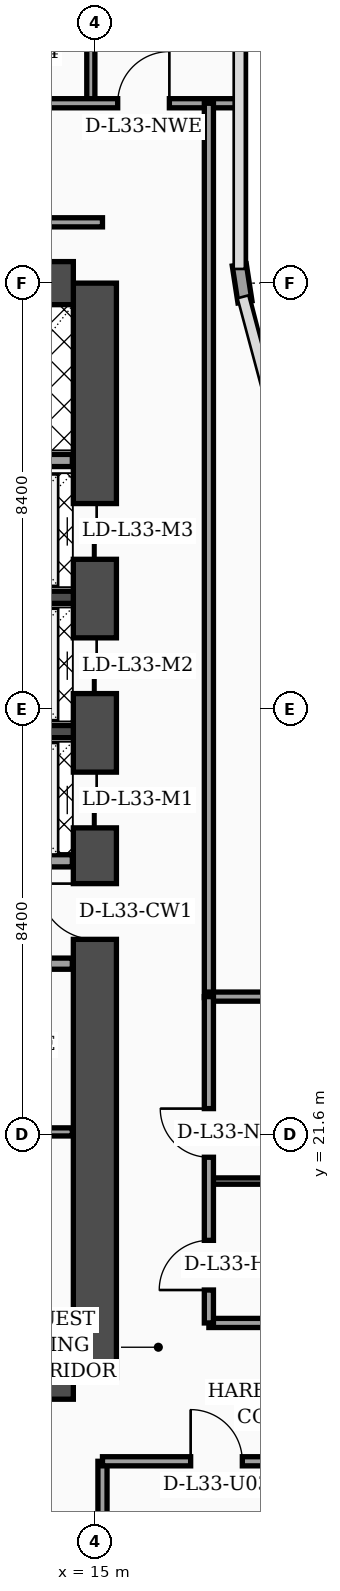
"""IFC4 building model, lengths in metres.
Left out: names, types, materials, properties, quantities, classifications, styles, units other than length and angle.
Written with IfcOpenShell. Run it as: python <this file> out.ifc"""

import sys

from ifc_helpers import new_model, si_unit, direction, frame, frame_2d, origin, place, context, subcontext, project, spatial, rectangle, extrude, element, fill, save


model = new_model("IFC4")
c1 = context("Model", 3, precision=1e-05, world=origin(), true_north=direction((0.0, 1.0)))
c2 = subcontext(c1, "Body", "Model", "MODEL_VIEW")
j1 = project(units=[si_unit("LENGTHUNIT", "METRE"), si_unit("PLANEANGLEUNIT", "RADIAN")], contexts=[c1])
p1 = place(None, origin())
s1 = spatial("IfcSite", under=j1, at=p1, CompositionType="ELEMENT")
p2 = place(p1, origin())
s2 = spatial("IfcBuilding", under=s1, at=p2, CompositionType="ELEMENT")
p3 = place(p2, frame((0.0, 0.0, 135.4)))
s3 = spatial("IfcBuildingStorey", under=s2, at=p3, CompositionType="ELEMENT", Elevation=135.4)
p4 = place(p3, frame((15.0, 16.8, 0.0), z_axis=(0.0, 0.0, 1.0), x_axis=(0.0, 1.0, 0.0)))
e1 = element("IfcWall", 1, at=p4, inside=s3, PredefinedType="SHEAR", context=c2, shape_type="SweptSolid", body=[
    extrude(rectangle(XDim=21.6, YDim=0.85, at=frame_2d((10.8, 0.0))), origin(), (0.0, 0.0, 1.0), 3.52),
])
p5 = place(p4, frame((8.65, 0.0, 0.0)))
e2 = element("IfcOpeningElement", 2, at=p5, cuts=e1, PredefinedType="OPENING", context=c2, shape_type="SweptSolid", body=[
    extrude(rectangle(XDim=1.1, YDim=2.2, at=frame_2d((0.55, 1.1))), frame((0.0, 0.435, 0.0), z_axis=(0.0, -1.0, 0.0), x_axis=(1.0, 0.0, 0.0)), (0.0, 0.0, 1.0), 0.87),
])
p6 = place(p4, frame((10.85, 0.0, 0.0)))
e3 = element("IfcOpeningElement", 3, at=p6, cuts=e1, PredefinedType="OPENING", context=c2, shape_type="SweptSolid", body=[
    extrude(rectangle(XDim=1.1, YDim=2.2, at=frame_2d((0.55, 1.1))), frame((0.0, 0.435, 0.0), z_axis=(0.0, -1.0, 0.0), x_axis=(1.0, 0.0, 0.0)), (0.0, 0.0, 1.0), 0.87),
])
p7 = place(p4, frame((13.5, 0.0, 0.0)))
e4 = element("IfcOpeningElement", 4, at=p7, cuts=e1, PredefinedType="OPENING", context=c2, shape_type="SweptSolid", body=[
    extrude(rectangle(XDim=1.1, YDim=2.2, at=frame_2d((0.55, 1.1))), frame((0.0, 0.435, 0.0), z_axis=(0.0, -1.0, 0.0), x_axis=(1.0, 0.0, 0.0)), (0.0, 0.0, 1.0), 0.87),
])
p8 = place(p4, frame((16.15, 0.0, 0.0)))
e5 = element("IfcOpeningElement", 5, at=p8, cuts=e1, PredefinedType="OPENING", context=c2, shape_type="SweptSolid", body=[
    extrude(rectangle(XDim=1.1, YDim=2.2, at=frame_2d((0.55, 1.1))), frame((0.0, 0.435, 0.0), z_axis=(0.0, -1.0, 0.0), x_axis=(1.0, 0.0, 0.0)), (0.0, 0.0, 1.0), 0.87),
])
for number, where, z_axis, x_axis in (
    (6, (4.625, 38.4, 0.0), (0.0, 0.0, 1.0), (1.0, 0.0, 0.0)),
    (7, (4.625, 16.8, 0.0), (0.0, 0.0, 1.0), (1.0, 0.0, 0.0)),
):
    element("IfcWall", number, at=place(p3, frame(where, z_axis=z_axis, x_axis=x_axis)), inside=s3, PredefinedType="SHEAR", context=c2, shape_type="SweptSolid", body=[
        extrude(rectangle(XDim=9.95, YDim=0.85, at=frame_2d((4.975, 0.0))), origin(), (0.0, 0.0, 1.0), 3.52),
    ])
for number, where, z_axis, x_axis in (
    (8, (12.18, 29.55, 0.0), (0.0, 0.0, 1.0), (1.0, 0.0, 0.0)),
    (9, (12.18, 32.2, 0.0), (0.0, 0.0, 1.0), (1.0, 0.0, 0.0)),
):
    element("IfcWall", number, at=place(p3, frame(where, z_axis=z_axis, x_axis=x_axis)), inside=s3, PredefinedType="SOLIDWALL", context=c2, shape_type="SweptSolid", body=[
        extrude(rectangle(XDim=2.395, YDim=0.24, at=frame_2d((1.198, 0.0))), origin(), (0.0, 0.0, 1.0), 3.52),
    ])
p9 = place(p3, frame((17.962, 38.03, 0.0), z_axis=(0.0, 0.0, 1.0), x_axis=(-0.15141125477, 0.988470855377, 0.0)))
e10 = element("IfcWall", 10, at=p9, inside=s3, PredefinedType="SOLIDWALL", context=c2, shape_type="SweptSolid", body=[
    extrude(rectangle(XDim=0.739, YDim=0.28, at=frame_2d((0.369, 0.0))), origin(), (0.0, 0.0, 1.0), 3.52),
])
p10 = place(p3, frame((9.68, 21.65, 0.0), z_axis=(0.0, 0.0, 1.0), x_axis=(1.0, 0.0, 0.0)))
e11 = element("IfcWall", 11, at=p10, inside=s3, PredefinedType="PARTITIONING", context=c2, shape_type="SweptSolid", body=[
    extrude(rectangle(XDim=4.875, YDim=0.16, at=frame_2d((2.438, 0.0))), origin(), (0.0, 0.0, 1.0), 3.52),
])
p11 = place(p10, frame((1.1, 0.0, 0.0)))
e12 = element("IfcOpeningElement", 12, at=p11, cuts=e11, PredefinedType="OPENING", context=c2, shape_type="SweptSolid", body=[
    extrude(rectangle(XDim=0.98, YDim=2.15, at=frame_2d((0.49, 1.075))), frame((0.0, 0.09, 0.0), z_axis=(0.0, -1.0, 0.0), x_axis=(1.0, 0.0, 0.0)), (0.0, 0.0, 1.0), 0.18),
])
p12 = place(p3, frame((9.68, 24.97, 0.0), z_axis=(0.0, 0.0, 1.0), x_axis=(1.0, 0.0, 0.0)))
e13 = element("IfcWall", 13, at=p12, inside=s3, PredefinedType="SOLIDWALL", context=c2, shape_type="SweptSolid", body=[
    extrude(rectangle(XDim=4.875, YDim=0.22, at=frame_2d((2.438, 0.0))), origin(), (0.0, 0.0, 1.0), 2.82),
])
p13 = place(p12, frame((0.9, 0.0, 0.0)))
e14 = element("IfcOpeningElement", 14, at=p13, cuts=e13, PredefinedType="OPENING", context=c2, shape_type="SweptSolid", body=[
    extrude(rectangle(XDim=0.98, YDim=2.15, at=frame_2d((0.49, 1.075))), frame((0.0, 0.12, 0.0), z_axis=(0.0, -1.0, 0.0), x_axis=(1.0, 0.0, 0.0)), (0.0, 0.0, 1.0), 0.24),
])
p14 = place(p3, frame((12.25, 27.0, 0.0), z_axis=(0.0, 0.0, 1.0), x_axis=(1.0, 0.0, 0.0)))
e15 = element("IfcWall", 15, at=p14, inside=s3, PredefinedType="SOLIDWALL", context=c2, shape_type="SweptSolid", body=[
    extrude(rectangle(XDim=2.305, YDim=0.24, at=frame_2d((1.152, 0.0))), origin(), (0.0, 0.0, 1.0), 3.52),
])
p15 = place(p3, frame((9.66, 34.9, 0.0), z_axis=(0.0, 0.0, 1.0), x_axis=(1.0, 0.0, 0.0)))
e16 = element("IfcWall", 16, at=p15, inside=s3, PredefinedType="SOLIDWALL", context=c2, shape_type="SweptSolid", body=[
    extrude(rectangle(XDim=4.895, YDim=0.24, at=frame_2d((2.448, 0.0))), origin(), (0.0, 0.0, 1.0), 3.52),
])
p16 = place(p3, frame((15.15, 2.44, 0.0), z_axis=(0.0, 0.0, 1.0), x_axis=(0.0, 1.0, 0.0)))
e17 = element("IfcWall", 17, at=p16, inside=s3, PredefinedType="PARTITIONING", context=c2, shape_type="SweptSolid", body=[
    extrude(rectangle(XDim=12.71, YDim=0.18, at=frame_2d((6.355, 0.0))), origin(), (0.0, 0.0, 1.0), 3.02),
])
p17 = place(p3, frame((15.15, 15.15, 0.0), z_axis=(0.0, 0.0, 1.0), x_axis=(1.0, 0.0, 0.0)))
e18 = element("IfcWall", 18, at=p17, inside=s3, PredefinedType="PARTITIONING", context=c2, shape_type="SweptSolid", body=[
    extrude(rectangle(XDim=6.45, YDim=0.18, at=frame_2d((3.225, 0.0))), origin(), (0.0, 0.0, 1.0), 2.47),
])
p18 = place(p17, frame((1.74, 0.0, 0.0)))
e19 = element("IfcOpeningElement", 19, at=p18, cuts=e18, PredefinedType="OPENING", context=c2, shape_type="SweptSolid", body=[
    extrude(rectangle(XDim=1.02, YDim=2.2, at=frame_2d((0.51, 1.1))), frame((0.0, 0.1, 0.0), z_axis=(0.0, -1.0, 0.0), x_axis=(1.0, 0.0, 0.0)), (0.0, 0.0, 1.0), 0.2),
])
p19 = place(p3, frame((14.92, 41.95, 0.0), z_axis=(0.0, 0.0, 1.0), x_axis=(0.0, 1.0, 0.0)))
e20 = element("IfcWall", 20, at=p19, inside=s3, PredefinedType="PARTITIONING", context=c2, shape_type="SweptSolid", body=[
    extrude(rectangle(XDim=5.85, YDim=0.16, at=frame_2d((2.925, 0.0))), origin(), (0.0, 0.0, 1.0), 3.02),
])
p20 = place(p3, frame((0.08, 41.95, 0.0), z_axis=(0.0, 0.0, 1.0), x_axis=(1.0, 0.0, 0.0)))
e21 = element("IfcWall", 21, at=p20, inside=s3, PredefinedType="PARTITIONING", context=c2, shape_type="SweptSolid", body=[
    extrude(rectangle(XDim=17.77, YDim=0.18, at=frame_2d((8.885, 0.0))), origin(), (0.0, 0.0, 1.0), 2.82),
])
p21 = place(p20, frame((0.9, 0.0, 0.0)))
e22 = element("IfcOpeningElement", 22, at=p21, cuts=e21, PredefinedType="OPENING", context=c2, shape_type="SweptSolid", body=[
    extrude(rectangle(XDim=1.02, YDim=2.2, at=frame_2d((0.51, 1.1))), frame((0.0, 0.1, 0.0), z_axis=(0.0, -1.0, 0.0), x_axis=(1.0, 0.0, 0.0)), (0.0, 0.0, 1.0), 0.2),
])
p22 = place(p20, frame((7.38, 0.0, 0.0)))
e23 = element("IfcOpeningElement", 23, at=p22, cuts=e21, PredefinedType="OPENING", context=c2, shape_type="SweptSolid", body=[
    extrude(rectangle(XDim=1.02, YDim=2.2, at=frame_2d((0.51, 1.1))), frame((0.0, 0.1, 0.0), z_axis=(0.0, -1.0, 0.0), x_axis=(1.0, 0.0, 0.0)), (0.0, 0.0, 1.0), 0.2),
])
p23 = place(p20, frame((15.37, 0.0, 0.0)))
e24 = element("IfcOpeningElement", 24, at=p23, cuts=e21, PredefinedType="OPENING", context=c2, shape_type="SweptSolid", body=[
    extrude(rectangle(XDim=1.02, YDim=2.2, at=frame_2d((0.51, 1.1))), frame((0.0, 0.1, 0.0), z_axis=(0.0, -1.0, 0.0), x_axis=(1.0, 0.0, 0.0)), (0.0, 0.0, 1.0), 0.2),
])
p24 = place(p3, frame((17.25, 24.3, 0.0), z_axis=(0.0, 0.0, 1.0), x_axis=(0.0, 1.0, 0.0)))
e25 = element("IfcWall", 25, at=p24, inside=s3, PredefinedType="PARTITIONING", context=c2, shape_type="SweptSolid", body=[
    extrude(rectangle(XDim=17.65, YDim=0.18, at=frame_2d((8.825, 0.0))), origin(), (0.0, 0.0, 1.0), 2.82),
])
p25 = place(p3, frame((3.755, 39.6, 0.0), z_axis=(0.0, 0.0, 1.0), x_axis=(1.0, 0.0, 0.0)))
e26 = element("IfcWall", 26, at=p25, inside=s3, PredefinedType="PARTITIONING", context=c2, shape_type="SweptSolid", body=[
    extrude(rectangle(XDim=11.395, YDim=0.18, at=frame_2d((5.698, 0.0))), origin(), (0.0, 0.0, 1.0), 2.82),
])
p26 = place(p3, frame((17.25, 17.88, 0.0), z_axis=(0.0, 0.0, 1.0), x_axis=(1.0, 0.0, 0.0)))
e27 = element("IfcWall", 27, at=p26, inside=s3, PredefinedType="PARTITIONING", context=c2, shape_type="SweptSolid", body=[
    extrude(rectangle(XDim=4.3, YDim=0.18, at=frame_2d((2.15, 0.0))), origin(), (0.0, 0.0, 1.0), 3.52),
])
p27 = place(p3, frame((17.25, 20.68, 0.0), z_axis=(0.0, 0.0, 1.0), x_axis=(1.0, 0.0, 0.0)))
e28 = element("IfcWall", 28, at=p27, inside=s3, PredefinedType="PARTITIONING", context=c2, shape_type="SweptSolid", body=[
    extrude(rectangle(XDim=4.3, YDim=0.125, at=frame_2d((2.15, 0.0))), origin(), (0.0, 0.0, 1.0), 3.52),
])
p28 = place(p3, frame((17.25, 24.32, 0.0), z_axis=(0.0, 0.0, 1.0), x_axis=(1.0, 0.0, 0.0)))
e29 = element("IfcWall", 29, at=p28, inside=s3, PredefinedType="PARTITIONING", context=c2, shape_type="SweptSolid", body=[
    extrude(rectangle(XDim=4.35, YDim=0.18, at=frame_2d((2.175, 0.0))), origin(), (0.0, 0.0, 1.0), 3.52),
])
p29 = place(p3, frame((17.25, 17.88, 0.0), z_axis=(0.0, 0.0, 1.0), x_axis=(0.0, 1.0, 0.0)))
e30 = element("IfcWall", 30, at=p29, inside=s3, PredefinedType="PARTITIONING", context=c2, shape_type="SweptSolid", body=[
    extrude(rectangle(XDim=6.44, YDim=0.18, at=frame_2d((3.22, 0.0))), origin(), (0.0, 0.0, 1.0), 3.52),
])
p30 = place(p29, frame((0.65, 0.0, 0.0)))
e31 = element("IfcOpeningElement", 31, at=p30, cuts=e30, PredefinedType="OPENING", context=c2, shape_type="SweptSolid", body=[
    extrude(rectangle(XDim=0.98, YDim=2.15, at=frame_2d((0.49, 1.075))), frame((0.0, 0.1, 0.0), z_axis=(0.0, -1.0, 0.0), x_axis=(1.0, 0.0, 0.0)), (0.0, 0.0, 1.0), 0.2),
])
p31 = place(p29, frame((3.27, 0.0, 0.0)))
e32 = element("IfcOpeningElement", 32, at=p31, cuts=e30, PredefinedType="OPENING", context=c2, shape_type="SweptSolid", body=[
    extrude(rectangle(XDim=0.96, YDim=2.2, at=frame_2d((0.48, 1.1))), frame((0.0, 0.1, 0.0), z_axis=(0.0, -1.0, 0.0), x_axis=(1.0, 0.0, 0.0)), (0.0, 0.0, 1.0), 0.2),
])
p32 = place(p18, origin())
e33 = element("IfcDoor", 33, at=p32, inside=s3, OperationType="SINGLE_SWING_LEFT", PredefinedType="DOOR", context=c2, shape_type="SweptSolid", body=[
    extrude(rectangle(XDim=1.02, YDim=2.2, at=frame_2d((0.51, 1.1))), frame((0.0, 0.025, 0.0), z_axis=(0.0, -1.0, 0.0), x_axis=(1.0, 0.0, 0.0)), (0.0, 0.0, 1.0), 0.05),
])
fill(e19, e33)
p33 = place(p23, origin())
e34 = element("IfcDoor", 34, at=p33, inside=s3, OperationType="SINGLE_SWING_RIGHT", PredefinedType="DOOR", context=c2, shape_type="SweptSolid", body=[
    extrude(rectangle(XDim=1.02, YDim=2.2, at=frame_2d((0.51, 1.1))), frame((0.0, 0.025, 0.0), z_axis=(0.0, -1.0, 0.0), x_axis=(1.0, 0.0, 0.0)), (0.0, 0.0, 1.0), 0.05),
])
fill(e24, e34)
p34 = place(p30, origin())
e35 = element("IfcDoor", 35, at=p34, inside=s3, OperationType="SINGLE_SWING_LEFT", PredefinedType="DOOR", context=c2, shape_type="SweptSolid", body=[
    extrude(rectangle(XDim=0.98, YDim=2.15, at=frame_2d((0.49, 1.075))), frame((0.0, 0.025, 0.0), z_axis=(0.0, -1.0, 0.0), x_axis=(1.0, 0.0, 0.0)), (0.0, 0.0, 1.0), 0.05),
])
fill(e31, e35)
p35 = place(p31, origin())
e36 = element("IfcDoor", 36, at=p35, inside=s3, OperationType="SINGLE_SWING_RIGHT", PredefinedType="DOOR", context=c2, shape_type="SweptSolid", body=[
    extrude(rectangle(XDim=0.96, YDim=2.2, at=frame_2d((0.48, 1.1))), frame((0.0, 0.025, 0.0), z_axis=(0.0, -1.0, 0.0), x_axis=(1.0, 0.0, 0.0)), (0.0, 0.0, 1.0), 0.05),
])
fill(e32, e36)
p36 = place(p5, origin())
e37 = element("IfcDoor", 37, at=p36, inside=s3, OperationType="SINGLE_SWING_RIGHT", PredefinedType="DOOR", context=c2, shape_type="SweptSolid", body=[
    extrude(rectangle(XDim=1.1, YDim=2.2, at=frame_2d((0.55, 1.1))), frame((0.0, 0.025, 0.0), z_axis=(0.0, -1.0, 0.0), x_axis=(1.0, 0.0, 0.0)), (0.0, 0.0, 1.0), 0.05),
])
fill(e2, e37)
p37 = place(p6, origin())
e38 = element("IfcDoor", 38, at=p37, inside=s3, OperationType="DOUBLE_DOOR_SLIDING", PredefinedType="DOOR", context=c2, shape_type="SweptSolid", body=[
    extrude(rectangle(XDim=1.1, YDim=2.2, at=frame_2d((0.55, 1.1))), frame((0.0, 0.025, 0.0), z_axis=(0.0, -1.0, 0.0), x_axis=(1.0, 0.0, 0.0)), (0.0, 0.0, 1.0), 0.05),
])
fill(e3, e38)
p38 = place(p7, origin())
e39 = element("IfcDoor", 39, at=p38, inside=s3, OperationType="DOUBLE_DOOR_SLIDING", PredefinedType="DOOR", context=c2, shape_type="SweptSolid", body=[
    extrude(rectangle(XDim=1.1, YDim=2.2, at=frame_2d((0.55, 1.1))), frame((0.0, 0.025, 0.0), z_axis=(0.0, -1.0, 0.0), x_axis=(1.0, 0.0, 0.0)), (0.0, 0.0, 1.0), 0.05),
])
fill(e4, e39)
p39 = place(p8, origin())
e40 = element("IfcDoor", 40, at=p39, inside=s3, OperationType="DOUBLE_DOOR_SLIDING", PredefinedType="DOOR", context=c2, shape_type="SweptSolid", body=[
    extrude(rectangle(XDim=1.1, YDim=2.2, at=frame_2d((0.55, 1.1))), frame((0.0, 0.025, 0.0), z_axis=(0.0, -1.0, 0.0), x_axis=(1.0, 0.0, 0.0)), (0.0, 0.0, 1.0), 0.05),
])
fill(e5, e40)
save(model, sys.argv[1])
